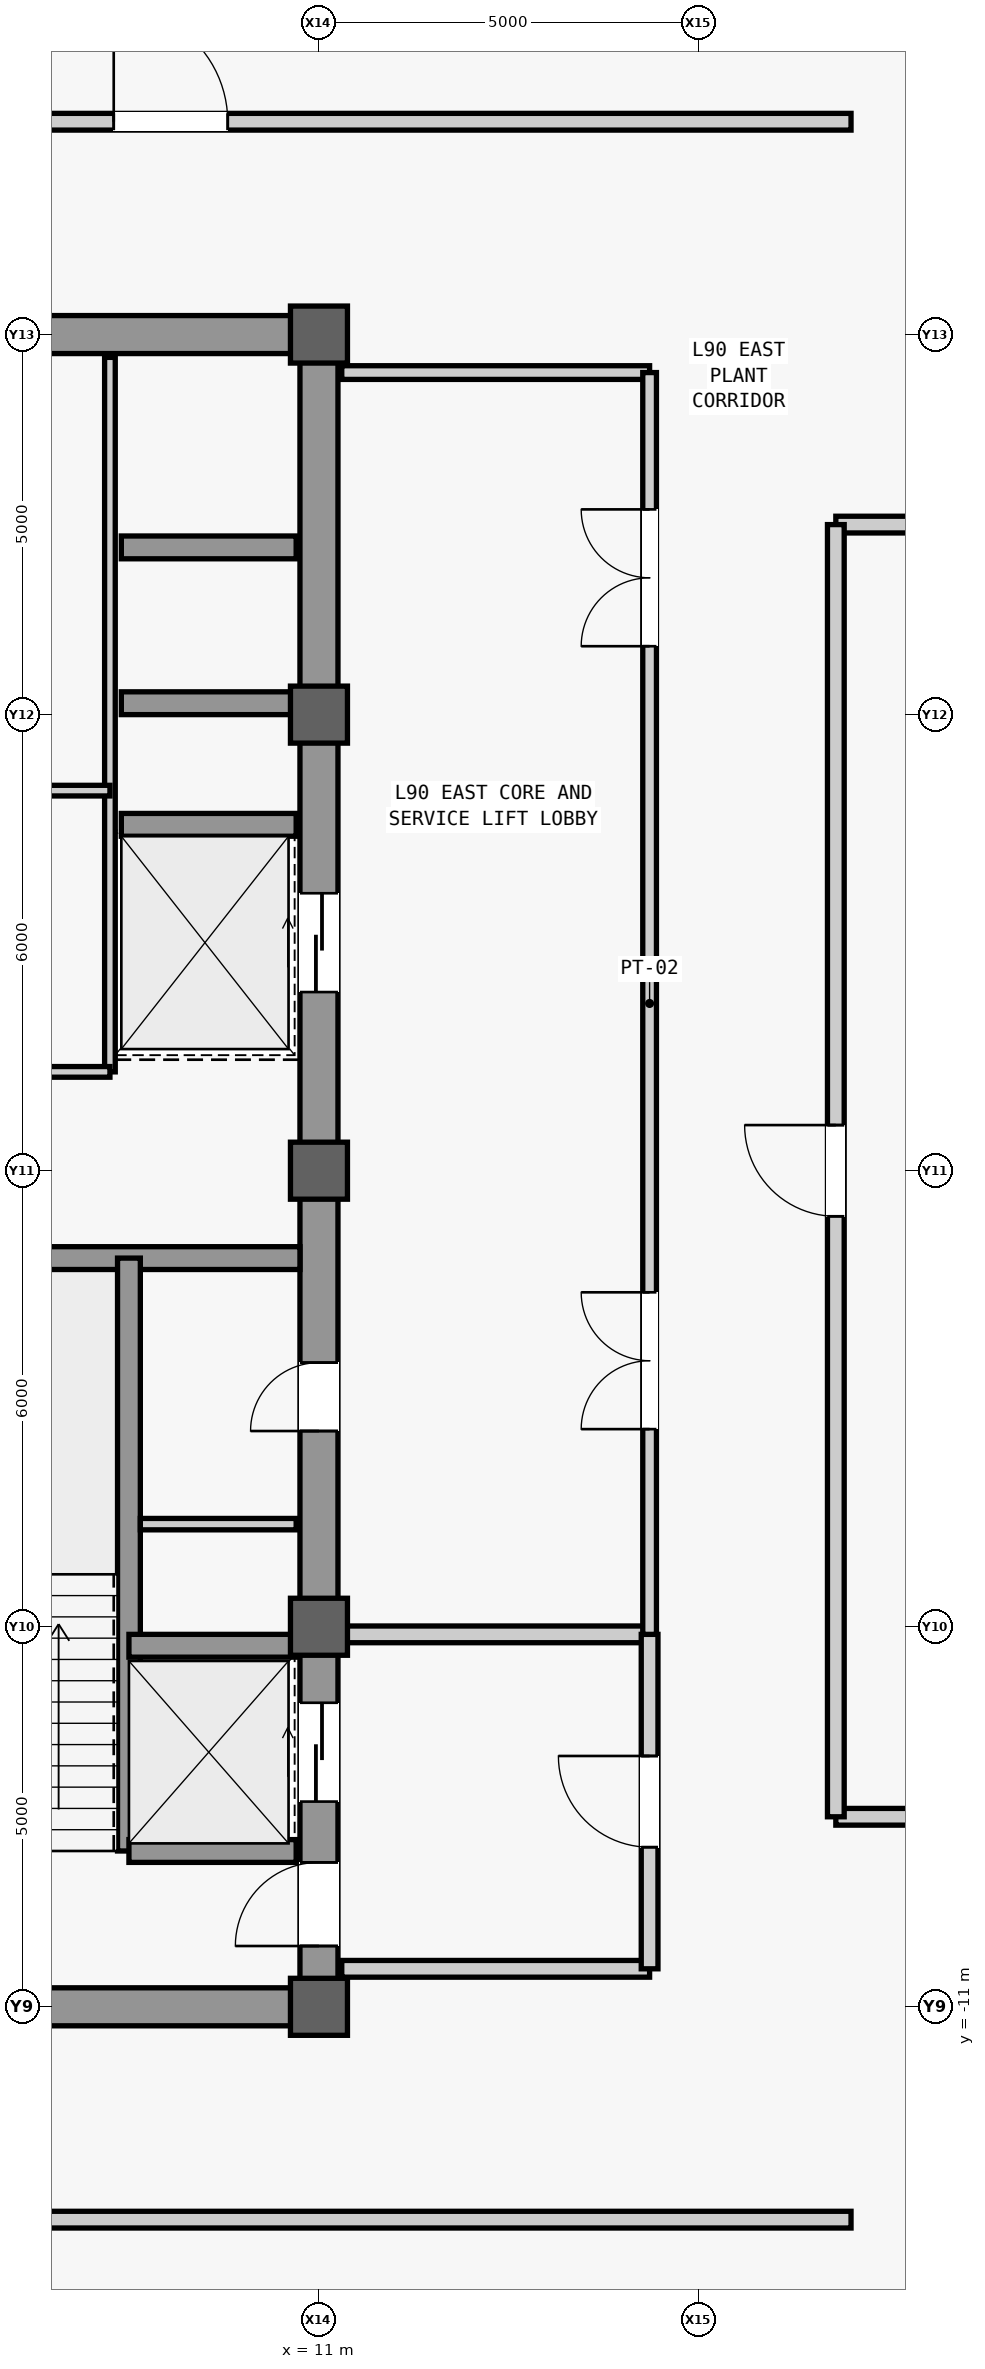
"""IFC4 building model, lengths in metres.
Left out: names, types, materials, properties, quantities, classifications, styles, units other than length and angle.
Written with IfcOpenShell. Run it as: python <this file> out.ifc"""

import sys

from ifc_helpers import new_model, si_unit, direction, frame, frame_2d, origin, origin_2d, place, context, subcontext, project, spatial, rectangle, extrude, source, transform, mapped, element, fill, save


model = new_model("IFC4")
c1 = context("Model", 3, precision=1e-05, world=origin(), true_north=direction((0.0, 1.0)))
c2 = subcontext(c1, "Body", "Model", "MODEL_VIEW")
j1 = project(units=[si_unit("LENGTHUNIT", "METRE"), si_unit("PLANEANGLEUNIT", "RADIAN")], contexts=[c1])
p1 = place(None, origin())
s1 = spatial("IfcSite", under=j1, at=p1, CompositionType="ELEMENT")
p2 = place(p1, origin())
s2 = spatial("IfcBuilding", under=s1, at=p2, CompositionType="ELEMENT")
p3 = place(p2, frame((0.0, 0.0, 380.3)))
s3 = spatial("IfcBuildingStorey", under=s2, at=p3, CompositionType="ELEMENT", Elevation=380.3)
m1 = source(origin(), c2, "Body", "SweptSolid", [
    extrude(rectangle(XDim=22.0, YDim=0.5, at=frame_2d((11.0, 0.0))), origin(), (0.0, 0.0, 1.0), 4.45),
])
p4 = place(p3, frame((11.0, -11.0, 0.0), z_axis=(0.0, 0.0, 1.0), x_axis=(0.0, 1.0, 0.0)))
e1 = element("IfcWall", 1, at=p4, inside=s3, PredefinedType="SHEAR", context=c2, shape_type="MappedRepresentation", body=[
    mapped(m1, transform((0.0, 0.0, 0.0), scale=1.0)),
])
m2 = source(origin(), c2, "Body", "SweptSolid", [
    extrude(rectangle(XDim=1.1, YDim=2.2, at=frame_2d((0.55, 1.1))), frame((0.0, 0.26, 0.0), z_axis=(0.0, -1.0, 0.0), x_axis=(1.0, 0.0, 0.0)), (0.0, 0.0, 1.0), 0.52),
])
p5 = place(p4, frame((0.8, 0.0, 0.0)))
e2 = element("IfcOpeningElement", 2, at=p5, cuts=e1, PredefinedType="OPENING", context=c2, shape_type="MappedRepresentation", body=[
    mapped(m2, transform((0.0, 0.0, 0.0), scale=1.0)),
])
m3 = source(origin(), c2, "Body", "SweptSolid", [
    extrude(rectangle(XDim=0.9, YDim=2.15, at=frame_2d((0.45, 1.075))), frame((0.0, 0.26, 0.0), z_axis=(0.0, -1.0, 0.0), x_axis=(1.0, 0.0, 0.0)), (0.0, 0.0, 1.0), 0.52),
])
p6 = place(p4, frame((7.575, 0.0, 0.0)))
e3 = element("IfcOpeningElement", 3, at=p6, cuts=e1, PredefinedType="OPENING", context=c2, shape_type="MappedRepresentation", body=[
    mapped(m3, transform((0.0, 0.0, 0.0), scale=1.0)),
])
m4 = source(origin(), c2, "Body", "SweptSolid", [
    extrude(rectangle(XDim=1.3, YDim=2.3, at=frame_2d((0.65, 1.15))), frame((0.0, 0.26, 0.0), z_axis=(0.0, -1.0, 0.0), x_axis=(1.0, 0.0, 0.0)), (0.0, 0.0, 1.0), 0.52),
])
p7 = place(p4, frame((2.7, 0.0, 0.0)))
e4 = element("IfcOpeningElement", 4, at=p7, cuts=e1, PredefinedType="OPENING", context=c2, shape_type="MappedRepresentation", body=[
    mapped(m4, transform((0.0, 0.0, 0.0), scale=1.0)),
])
p8 = place(p4, frame((13.35, 0.0, 0.0)))
e5 = element("IfcOpeningElement", 5, at=p8, cuts=e1, PredefinedType="OPENING", context=c2, shape_type="MappedRepresentation", body=[
    mapped(m4, transform((0.0, 0.0, 0.0), scale=1.0)),
])
m5 = source(origin(), c2, "Body", "SweptSolid", [
    extrude(rectangle(XDim=5.9, YDim=0.5, at=frame_2d((2.95, 0.0))), origin(), (0.0, 0.0, 1.0), 4.45),
])
p9 = place(p3, frame((4.85, -11.0, 0.0), z_axis=(0.0, 0.0, 1.0), x_axis=(1.0, 0.0, 0.0)))
e6 = element("IfcWall", 6, at=p9, inside=s3, PredefinedType="SHEAR", context=c2, shape_type="MappedRepresentation", body=[
    mapped(m5, transform((0.0, 0.0, 0.0), scale=1.0)),
])
p10 = place(p3, frame((4.85, 11.0, 0.0), z_axis=(0.0, 0.0, 1.0), x_axis=(1.0, 0.0, 0.0)))
e7 = element("IfcWall", 7, at=p10, inside=s3, PredefinedType="SHEAR", context=c2, shape_type="MappedRepresentation", body=[
    mapped(m5, transform((0.0, 0.0, 0.0), scale=1.0)),
])
p11 = place(p10, frame((0.5, 0.0, 0.0)))
e8 = element("IfcOpeningElement", 8, at=p11, cuts=e7, PredefinedType="OPENING", context=c2, shape_type="MappedRepresentation", body=[
    mapped(m3, transform((0.0, 0.0, 0.0), scale=1.0)),
])
m6 = source(origin(), c2, "Body", "SweptSolid", [
    extrude(rectangle(XDim=5.65, YDim=0.3, at=frame_2d((2.825, 0.0))), origin(), (0.0, 0.0, 1.0), 4.45),
])
p12 = place(p3, frame((5.1, -1.15, 0.0), z_axis=(0.0, 0.0, 1.0), x_axis=(1.0, 0.0, 0.0)))
e9 = element("IfcWall", 9, at=p12, inside=s3, PredefinedType="SHEAR", context=c2, shape_type="MappedRepresentation", body=[
    mapped(m6, transform((0.0, 0.0, 0.0), scale=1.0)),
])
m7 = source(origin(), c2, "Body", "SweptSolid", [
    extrude(rectangle(XDim=0.75, YDim=0.75, at=origin_2d()), origin(), (0.0, 0.0, 1.0), 4.8),
])
for number, where, z_axis, x_axis in (
    (10, (11.0, -11.0, 0.0), (0.0, 0.0, 1.0), (1.0, 0.0, 0.0)),
    (11, (11.0, -6.0, 0.0), (0.0, 0.0, 1.0), (1.0, 0.0, 0.0)),
    (12, (11.0, 0.0, 0.0), (0.0, 0.0, 1.0), (1.0, 0.0, 0.0)),
    (13, (11.0, 6.0, 0.0), (0.0, 0.0, 1.0), (1.0, 0.0, 0.0)),
    (14, (11.0, 11.0, 0.0), (0.0, 0.0, 1.0), (1.0, 0.0, 0.0)),
):
    element("IfcColumn", number, at=place(p3, frame(where, z_axis=z_axis, x_axis=x_axis)), inside=s3, PredefinedType="COLUMN", context=c2, shape_type="MappedRepresentation", body=[
        mapped(m7, transform((0.0, 0.0, 0.0), scale=1.0)),
    ])
m8 = source(origin(), c2, "Body", "SweptSolid", [
    extrude(rectangle(XDim=7.8, YDim=0.3, at=frame_2d((3.9, 0.0))), origin(), (0.0, 0.0, 1.0), 4.45),
])
p13 = place(p3, frame((8.5, -8.95, 0.0), z_axis=(0.0, 0.0, 1.0), x_axis=(0.0, 1.0, 0.0)))
e15 = element("IfcWall", 15, at=p13, inside=s3, PredefinedType="SHEAR", context=c2, shape_type="MappedRepresentation", body=[
    mapped(m8, transform((0.0, 0.0, 0.0), scale=1.0)),
])
m9 = source(origin(), c2, "Body", "SweptSolid", [
    extrude(rectangle(XDim=2.2, YDim=0.3, at=frame_2d((1.1, 0.0))), origin(), (0.0, 0.0, 1.0), 4.45),
])
for number, where, z_axis, x_axis in (
    (16, (8.5, -8.95, 0.0), (0.0, 0.0, 1.0), (1.0, 0.0, 0.0)),
    (17, (8.5, -6.25, 0.0), (0.0, 0.0, 1.0), (1.0, 0.0, 0.0)),
):
    element("IfcWall", number, at=place(p3, frame(where, z_axis=z_axis, x_axis=x_axis)), inside=s3, PredefinedType="SHEAR", context=c2, shape_type="MappedRepresentation", body=[
        mapped(m9, transform((0.0, 0.0, 0.0), scale=1.0)),
    ])
m10 = source(origin(), c2, "Body", "SweptSolid", [
    extrude(rectangle(XDim=2.3, YDim=0.3, at=frame_2d((1.15, 0.0))), origin(), (0.0, 0.0, 1.0), 4.45),
])
for number, where, z_axis, x_axis in (
    (18, (8.4, 4.55, 0.0), (0.0, 0.0, 1.0), (1.0, 0.0, 0.0)),
    (19, (8.4, 6.15, 0.0), (0.0, 0.0, 1.0), (1.0, 0.0, 0.0)),
    (20, (8.4, 8.2, 0.0), (0.0, 0.0, 1.0), (1.0, 0.0, 0.0)),
):
    element("IfcWall", number, at=place(p3, frame(where, z_axis=z_axis, x_axis=x_axis)), inside=s3, PredefinedType="SHEAR", context=c2, shape_type="MappedRepresentation", body=[
        mapped(m10, transform((0.0, 0.0, 0.0), scale=1.0)),
    ])
m11 = source(origin(), c2, "Body", "SweptSolid", [
    extrude(rectangle(XDim=2.05, YDim=0.15, at=frame_2d((1.025, 0.0))), origin(), (0.0, 0.0, 1.0), 4.45),
])
p14 = place(p3, frame((8.65, -4.65, 0.0), z_axis=(0.0, 0.0, 1.0), x_axis=(1.0, 0.0, 0.0)))
e21 = element("IfcWall", 21, at=p14, inside=s3, PredefinedType="PARTITIONING", context=c2, shape_type="MappedRepresentation", body=[
    mapped(m11, transform((0.0, 0.0, 0.0), scale=1.0)),
])
m12 = source(origin(), c2, "Body", "SweptSolid", [
    extrude(rectangle(XDim=9.4, YDim=0.14, at=frame_2d((4.7, 0.0))), origin(), (0.0, 0.0, 1.0), 4.45),
])
p15 = place(p3, frame((8.25, 1.3, 0.0), z_axis=(0.0, 0.0, 1.0), x_axis=(0.0, 1.0, 0.0)))
e22 = element("IfcWall", 22, at=p15, inside=s3, PredefinedType="PARTITIONING", context=c2, shape_type="MappedRepresentation", body=[
    mapped(m12, transform((0.0, 0.0, 0.0), scale=1.0)),
])
m13 = source(origin(), c2, "Body", "SweptSolid", [
    extrude(rectangle(XDim=3.15, YDim=0.14, at=frame_2d((1.575, 0.0))), origin(), (0.0, 0.0, 1.0), 4.45),
])
p16 = place(p3, frame((5.1, 1.3, 0.0), z_axis=(0.0, 0.0, 1.0), x_axis=(1.0, 0.0, 0.0)))
e23 = element("IfcWall", 23, at=p16, inside=s3, PredefinedType="PARTITIONING", context=c2, shape_type="MappedRepresentation", body=[
    mapped(m13, transform((0.0, 0.0, 0.0), scale=1.0)),
])
p17 = place(p3, frame((5.1, 5.0, 0.0), z_axis=(0.0, 0.0, 1.0), x_axis=(1.0, 0.0, 0.0)))
e24 = element("IfcWall", 24, at=p17, inside=s3, PredefinedType="PARTITIONING", context=c2, shape_type="MappedRepresentation", body=[
    mapped(m13, transform((0.0, 0.0, 0.0), scale=1.0)),
])
m14 = source(origin(), c2, "Body", "SweptSolid", [
    extrude(rectangle(XDim=0.9, YDim=2.15, at=frame_2d((0.45, 1.075))), frame((0.0, 0.08, 0.0), z_axis=(0.0, -1.0, 0.0), x_axis=(1.0, 0.0, 0.0)), (0.0, 0.0, 1.0), 0.16),
])
p18 = place(p17, frame((0.25, 0.0, 0.0)))
e25 = element("IfcOpeningElement", 25, at=p18, cuts=e24, PredefinedType="OPENING", context=c2, shape_type="MappedRepresentation", body=[
    mapped(m14, transform((0.0, 0.0, 0.0), scale=1.0)),
])
m15 = source(origin(), c2, "Body", "SweptSolid", [
    extrude(rectangle(XDim=4.05, YDim=0.22, at=frame_2d((2.025, 0.0))), origin(), (0.0, 0.0, 1.0), 4.45),
])
p19 = place(p3, frame((11.3, -10.5, 0.0), z_axis=(0.0, 0.0, 1.0), x_axis=(1.0, 0.0, 0.0)))
e26 = element("IfcWall", 26, at=p19, inside=s3, PredefinedType="PARTITIONING", context=c2, shape_type="MappedRepresentation", body=[
    mapped(m15, transform((0.0, 0.0, 0.0), scale=1.0)),
])
m16 = source(origin(), c2, "Body", "SweptSolid", [
    extrude(rectangle(XDim=4.05, YDim=0.22, at=frame_2d((2.025, 0.0))), origin(), (0.0, 0.0, 1.0), 3.901),
])
p20 = place(p3, frame((11.3, -6.1, 0.0), z_axis=(0.0, 0.0, 1.0), x_axis=(1.0, 0.0, 0.0)))
e27 = element("IfcWall", 27, at=p20, inside=s3, PredefinedType="PARTITIONING", context=c2, shape_type="MappedRepresentation", body=[
    mapped(m16, transform((0.0, 0.0, 0.0), scale=1.0)),
])
m17 = source(origin(), c2, "Body", "SweptSolid", [
    extrude(rectangle(XDim=4.4, YDim=0.22, at=frame_2d((2.2, 0.0))), origin(), (0.0, 0.0, 1.0), 4.45),
])
p21 = place(p3, frame((15.35, -10.5, 0.0), z_axis=(0.0, 0.0, 1.0), x_axis=(0.0, 1.0, 0.0)))
e28 = element("IfcWall", 28, at=p21, inside=s3, PredefinedType="PARTITIONING", context=c2, shape_type="MappedRepresentation", body=[
    mapped(m17, transform((0.0, 0.0, 0.0), scale=1.0)),
])
m18 = source(origin(), c2, "Body", "SweptSolid", [
    extrude(rectangle(XDim=1.2, YDim=2.2, at=frame_2d((0.6, 1.1))), frame((0.0, 0.12, 0.0), z_axis=(0.0, -1.0, 0.0), x_axis=(1.0, 0.0, 0.0)), (0.0, 0.0, 1.0), 0.24),
])
p22 = place(p21, frame((1.6, 0.0, 0.0)))
e29 = element("IfcOpeningElement", 29, at=p22, cuts=e28, PredefinedType="OPENING", context=c2, shape_type="MappedRepresentation", body=[
    mapped(m18, transform((0.0, 0.0, 0.0), scale=1.0)),
])
m19 = source(origin(), c2, "Body", "SweptSolid", [
    extrude(rectangle(XDim=4.05, YDim=0.18, at=frame_2d((2.025, 0.0))), origin(), (0.0, 0.0, 1.0), 4.45),
])
p23 = place(p3, frame((11.3, 10.5, 0.0), z_axis=(0.0, 0.0, 1.0), x_axis=(1.0, 0.0, 0.0)))
e30 = element("IfcWall", 30, at=p23, inside=s3, PredefinedType="PARTITIONING", context=c2, shape_type="MappedRepresentation", body=[
    mapped(m19, transform((0.0, 0.0, 0.0), scale=1.0)),
])
m20 = source(origin(), c2, "Body", "SweptSolid", [
    extrude(rectangle(XDim=16.6, YDim=0.18, at=frame_2d((8.3, 0.0))), origin(), (0.0, 0.0, 1.0), 4.45),
])
p24 = place(p3, frame((15.35, -6.1, 0.0), z_axis=(0.0, 0.0, 1.0), x_axis=(0.0, 1.0, 0.0)))
e31 = element("IfcWall", 31, at=p24, inside=s3, PredefinedType="PARTITIONING", context=c2, shape_type="MappedRepresentation", body=[
    mapped(m20, transform((0.0, 0.0, 0.0), scale=1.0)),
])
m21 = source(origin(), c2, "Body", "SweptSolid", [
    extrude(rectangle(XDim=1.8, YDim=2.25, at=frame_2d((0.9, 1.125))), frame((0.0, 0.1, 0.0), z_axis=(0.0, -1.0, 0.0), x_axis=(1.0, 0.0, 0.0)), (0.0, 0.0, 1.0), 0.2),
])
p25 = place(p24, frame((2.7, 0.0, 0.0)))
e32 = element("IfcOpeningElement", 32, at=p25, cuts=e31, PredefinedType="OPENING", context=c2, shape_type="MappedRepresentation", body=[
    mapped(m21, transform((0.0, 0.0, 0.0), scale=1.0)),
])
p26 = place(p24, frame((13.0, 0.0, 0.0)))
e33 = element("IfcOpeningElement", 33, at=p26, cuts=e31, PredefinedType="OPENING", context=c2, shape_type="MappedRepresentation", body=[
    mapped(m21, transform((0.0, 0.0, 0.0), scale=1.0)),
])
m22 = source(origin(), c2, "Body", "SweptSolid", [
    extrude(rectangle(XDim=36.0, YDim=0.22, at=frame_2d((18.0, 0.0))), origin(), (0.0, 0.0, 1.0), 4.45),
])
p27 = place(p3, frame((-18.0, -13.8, 0.0), z_axis=(0.0, 0.0, 1.0), x_axis=(1.0, 0.0, 0.0)))
e34 = element("IfcWall", 34, at=p27, inside=s3, PredefinedType="PARTITIONING", context=c2, shape_type="MappedRepresentation", body=[
    mapped(m22, transform((0.0, 0.0, 0.0), scale=1.0)),
])
m23 = source(origin(), c2, "Body", "SweptSolid", [
    extrude(rectangle(XDim=1.5, YDim=2.3, at=frame_2d((0.75, 1.15))), frame((0.0, 0.12, 0.0), z_axis=(0.0, -1.0, 0.0), x_axis=(1.0, 0.0, 0.0)), (0.0, 0.0, 1.0), 0.24),
])
p28 = place(p27, frame((9.8, 0.0, 0.0)))
e35 = element("IfcOpeningElement", 35, at=p28, cuts=e34, PredefinedType="OPENING", context=c2, shape_type="MappedRepresentation", body=[
    mapped(m23, transform((0.0, 0.0, 0.0), scale=1.0)),
])
p29 = place(p27, frame((22.8, 0.0, 0.0)))
e36 = element("IfcOpeningElement", 36, at=p29, cuts=e34, PredefinedType="OPENING", context=c2, shape_type="MappedRepresentation", body=[
    mapped(m23, transform((0.0, 0.0, 0.0), scale=1.0)),
])
p30 = place(p3, frame((-18.0, 13.8, 0.0), z_axis=(0.0, 0.0, 1.0), x_axis=(1.0, 0.0, 0.0)))
e37 = element("IfcWall", 37, at=p30, inside=s3, PredefinedType="PARTITIONING", context=c2, shape_type="MappedRepresentation", body=[
    mapped(m22, transform((0.0, 0.0, 0.0), scale=1.0)),
])
p31 = place(p30, frame((8.15, 0.0, 0.0)))
e38 = element("IfcOpeningElement", 38, at=p31, cuts=e37, PredefinedType="OPENING", context=c2, shape_type="MappedRepresentation", body=[
    mapped(m23, transform((0.0, 0.0, 0.0), scale=1.0)),
])
p32 = place(p30, frame((16.55, 0.0, 0.0)))
e39 = element("IfcOpeningElement", 39, at=p32, cuts=e37, PredefinedType="OPENING", context=c2, shape_type="MappedRepresentation", body=[
    mapped(m23, transform((0.0, 0.0, 0.0), scale=1.0)),
])
p33 = place(p30, frame((26.3, 0.0, 0.0)))
e40 = element("IfcOpeningElement", 40, at=p33, cuts=e37, PredefinedType="OPENING", context=c2, shape_type="MappedRepresentation", body=[
    mapped(m23, transform((0.0, 0.0, 0.0), scale=1.0)),
])
m24 = source(origin(), c2, "Body", "SweptSolid", [
    extrude(rectangle(XDim=6.2, YDim=0.22, at=frame_2d((3.1, 0.0))), origin(), (0.0, 0.0, 1.0), 4.45),
])
for number, where, z_axis, x_axis in (
    (41, (17.8, -8.5, 0.0), (0.0, 0.0, 1.0), (1.0, 0.0, 0.0)),
    (42, (17.8, 8.5, 0.0), (0.0, 0.0, 1.0), (1.0, 0.0, 0.0)),
):
    element("IfcWall", number, at=place(p3, frame(where, z_axis=z_axis, x_axis=x_axis)), inside=s3, PredefinedType="PARTITIONING", context=c2, shape_type="MappedRepresentation", body=[
        mapped(m24, transform((0.0, 0.0, 0.0), scale=1.0)),
    ])
m25 = source(origin(), c2, "Body", "SweptSolid", [
    extrude(rectangle(XDim=17.0, YDim=0.22, at=frame_2d((8.5, 0.0))), origin(), (0.0, 0.0, 1.0), 4.45),
])
p34 = place(p3, frame((17.8, -8.5, 0.0), z_axis=(0.0, 0.0, 1.0), x_axis=(0.0, 1.0, 0.0)))
e43 = element("IfcWall", 43, at=p34, inside=s3, PredefinedType="PARTITIONING", context=c2, shape_type="MappedRepresentation", body=[
    mapped(m25, transform((0.0, 0.0, 0.0), scale=1.0)),
])
p35 = place(p34, frame((7.9, 0.0, 0.0)))
e44 = element("IfcOpeningElement", 44, at=p35, cuts=e43, PredefinedType="OPENING", context=c2, shape_type="MappedRepresentation", body=[
    mapped(m18, transform((0.0, 0.0, 0.0), scale=1.0)),
])
m26 = source(origin(), c2, "Body", "SweptSolid", [
    extrude(rectangle(XDim=1.1, YDim=2.2, at=frame_2d((0.55, 1.1))), frame((0.0, 0.025, 0.0), z_axis=(0.0, -1.0, 0.0), x_axis=(1.0, 0.0, 0.0)), (0.0, 0.0, 1.0), 0.05),
])
p36 = place(p5, origin())
e45 = element("IfcDoor", 45, at=p36, inside=s3, OperationType="SINGLE_SWING_LEFT", PredefinedType="DOOR", context=c2, shape_type="MappedRepresentation", body=[
    mapped(m26, transform((0.0, 0.0, 0.0), scale=1.0)),
])
fill(e2, e45)
m27 = source(origin(), c2, "Body", "SweptSolid", [
    extrude(rectangle(XDim=0.9, YDim=2.15, at=frame_2d((0.45, 1.075))), frame((0.0, 0.025, 0.0), z_axis=(0.0, -1.0, 0.0), x_axis=(1.0, 0.0, 0.0)), (0.0, 0.0, 1.0), 0.05),
])
p37 = place(p6, origin())
e46 = element("IfcDoor", 46, at=p37, inside=s3, OperationType="SINGLE_SWING_LEFT", PredefinedType="DOOR", context=c2, shape_type="MappedRepresentation", body=[
    mapped(m27, transform((0.0, 0.0, 0.0), scale=1.0)),
])
fill(e3, e46)
m28 = source(origin(), c2, "Body", "SweptSolid", [
    extrude(rectangle(XDim=1.2, YDim=2.2, at=frame_2d((0.6, 1.1))), frame((0.0, 0.025, 0.0), z_axis=(0.0, -1.0, 0.0), x_axis=(1.0, 0.0, 0.0)), (0.0, 0.0, 1.0), 0.05),
])
p38 = place(p22, origin())
e47 = element("IfcDoor", 47, at=p38, inside=s3, OperationType="SINGLE_SWING_RIGHT", PredefinedType="DOOR", context=c2, shape_type="MappedRepresentation", body=[
    mapped(m28, transform((0.0, 0.0, 0.0), scale=1.0)),
])
fill(e29, e47)
m29 = source(origin(), c2, "Body", "SweptSolid", [
    extrude(rectangle(XDim=1.8, YDim=2.25, at=frame_2d((0.9, 1.125))), frame((0.0, 0.025, 0.0), z_axis=(0.0, -1.0, 0.0), x_axis=(1.0, 0.0, 0.0)), (0.0, 0.0, 1.0), 0.05),
])
p39 = place(p25, origin())
e48 = element("IfcDoor", 48, at=p39, inside=s3, OperationType="SINGLE_SWING_RIGHT", PredefinedType="DOOR", context=c2, shape_type="MappedRepresentation", body=[
    mapped(m29, transform((0.0, 0.0, 0.0), scale=1.0)),
])
fill(e32, e48)
p40 = place(p26, origin())
e49 = element("IfcDoor", 49, at=p40, inside=s3, OperationType="SINGLE_SWING_LEFT", PredefinedType="DOOR", context=c2, shape_type="MappedRepresentation", body=[
    mapped(m29, transform((0.0, 0.0, 0.0), scale=1.0)),
])
fill(e33, e49)
m30 = source(origin(), c2, "Body", "SweptSolid", [
    extrude(rectangle(XDim=1.5, YDim=2.3, at=frame_2d((0.75, 1.15))), frame((0.0, 0.025, 0.0), z_axis=(0.0, -1.0, 0.0), x_axis=(1.0, 0.0, 0.0)), (0.0, 0.0, 1.0), 0.05),
])
p41 = place(p33, origin())
e50 = element("IfcDoor", 50, at=p41, inside=s3, OperationType="SINGLE_SWING_LEFT", PredefinedType="DOOR", context=c2, shape_type="MappedRepresentation", body=[
    mapped(m30, transform((0.0, 0.0, 0.0), scale=1.0)),
])
fill(e40, e50)
p42 = place(p35, origin())
e51 = element("IfcDoor", 51, at=p42, inside=s3, OperationType="SINGLE_SWING_RIGHT", PredefinedType="DOOR", context=c2, shape_type="MappedRepresentation", body=[
    mapped(m28, transform((0.0, 0.0, 0.0), scale=1.0)),
])
fill(e44, e51)
m31 = source(origin(), c2, "Body", "SweptSolid", [
    extrude(rectangle(XDim=1.3, YDim=2.3, at=frame_2d((0.65, 1.15))), frame((0.0, 0.025, 0.0), z_axis=(0.0, -1.0, 0.0), x_axis=(1.0, 0.0, 0.0)), (0.0, 0.0, 1.0), 0.05),
])
p43 = place(p7, origin())
e52 = element("IfcDoor", 52, at=p43, inside=s3, OperationType="SLIDING_TO_LEFT", PredefinedType="DOOR", context=c2, shape_type="MappedRepresentation", body=[
    mapped(m31, transform((0.0, 0.0, 0.0), scale=1.0)),
])
fill(e4, e52)
p44 = place(p8, origin())
e53 = element("IfcDoor", 53, at=p44, inside=s3, OperationType="SLIDING_TO_LEFT", PredefinedType="DOOR", context=c2, shape_type="MappedRepresentation", body=[
    mapped(m31, transform((0.0, 0.0, 0.0), scale=1.0)),
])
fill(e5, e53)
save(model, sys.argv[1])
